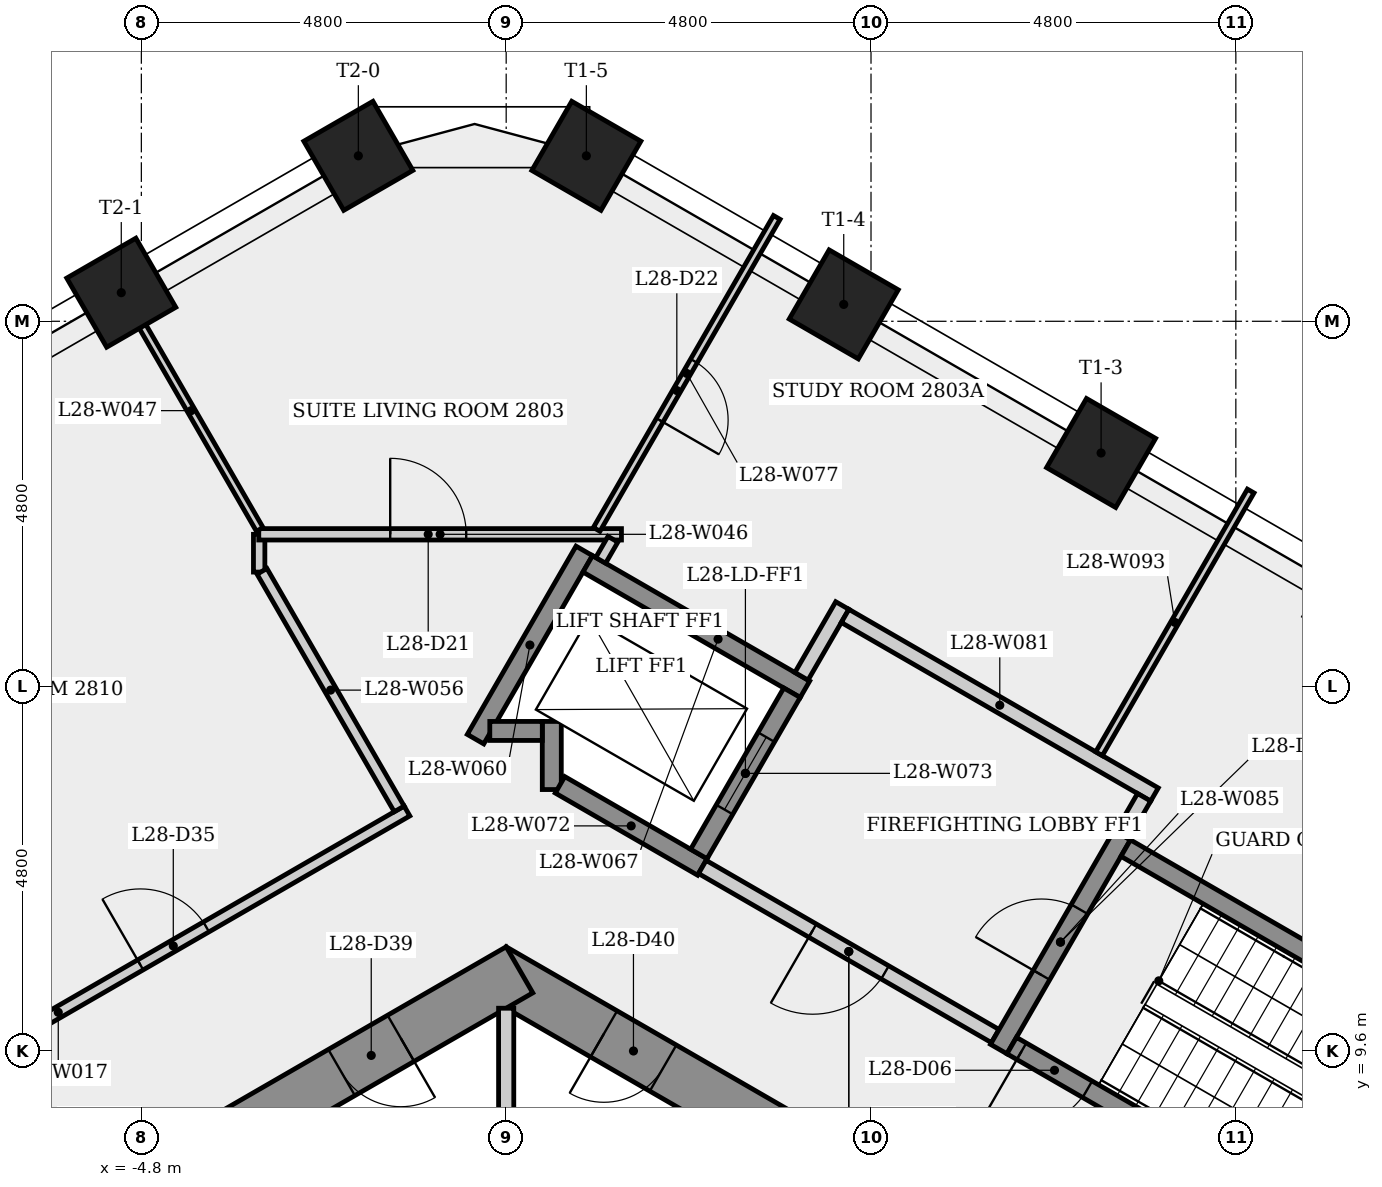
"""IFC4 building model, lengths in metres.
Left out: names, types, materials, properties, quantities, classifications, styles, units other than length and angle.
Written with IfcOpenShell. Run it as: python <this file> out.ifc"""

import sys

from ifc_helpers import new_model, si_unit, direction, frame, frame_2d, origin, origin_2d, place, context, subcontext, project, spatial, rectangle, extrude, element, fill, save


model = new_model("IFC4")
c1 = context("Model", 3, precision=1e-05, world=origin(), true_north=direction((0.0, 1.0)))
c2 = subcontext(c1, "Body", "Model", "MODEL_VIEW")
j1 = project(units=[si_unit("LENGTHUNIT", "METRE"), si_unit("PLANEANGLEUNIT", "RADIAN")], contexts=[c1])
p1 = place(None, origin())
s1 = spatial("IfcSite", under=j1, at=p1, CompositionType="ELEMENT")
p2 = place(p1, origin())
s2 = spatial("IfcBuilding", under=s1, at=p2, CompositionType="ELEMENT")
p3 = place(p2, frame((0.0, 0.0, 106.9)))
s3 = spatial("IfcBuildingStorey", under=s2, at=p3, CompositionType="ELEMENT", Elevation=106.9)
p4 = place(p3, frame((9.325, 5.182, 0.0), z_axis=(0.0, 0.0, 1.0), x_axis=(-0.866023993627, 0.500002442456, 0.0)))
e1 = element("IfcWall", 1, at=p4, inside=s3, PredefinedType="SHEAR", context=c2, shape_type="SweptSolid", body=[
    extrude(rectangle(XDim=10.97, YDim=0.7, at=frame_2d((5.485, 0.0))), origin(), (0.0, 0.0, 1.0), 3.4),
])
p5 = place(p4, frame((8.384, 0.0, 0.0)))
e2 = element("IfcOpeningElement", 2, at=p5, cuts=e1, PredefinedType="OPENING", context=c2, shape_type="SweptSolid", body=[
    extrude(rectangle(XDim=0.9, YDim=2.1, at=frame_2d((0.45, 1.05))), frame((0.0, 0.36, 0.0), z_axis=(0.0, -1.0, 0.0), x_axis=(1.0, 0.0, 0.0)), (0.0, 0.0, 1.0), 0.72),
])
p6 = place(p4, frame((1.663, 0.0, 0.0)))
e3 = element("IfcOpeningElement", 3, at=p6, cuts=e1, PredefinedType="OPENING", context=c2, shape_type="SweptSolid", body=[
    extrude(rectangle(XDim=0.9, YDim=2.1, at=frame_2d((0.45, 1.05))), frame((0.0, 0.36, 0.0), z_axis=(0.0, -1.0, 0.0), x_axis=(1.0, 0.0, 0.0)), (0.0, 0.0, 1.0), 0.72),
])
p7 = place(p3, frame((0.175, 10.667, 0.0), z_axis=(0.0, 0.0, 1.0), x_axis=(-0.866023993627, -0.500002442456, 0.0)))
e4 = element("IfcWall", 4, at=p7, inside=s3, PredefinedType="SHEAR", context=c2, shape_type="SweptSolid", body=[
    extrude(rectangle(XDim=10.97, YDim=0.7, at=frame_2d((5.485, 0.0))), origin(), (0.0, 0.0, 1.0), 3.4),
])
p8 = place(p7, frame((7.923, 0.0, 0.0)))
e5 = element("IfcOpeningElement", 5, at=p8, cuts=e4, PredefinedType="OPENING", context=c2, shape_type="SweptSolid", body=[
    extrude(rectangle(XDim=0.9, YDim=2.1, at=frame_2d((0.45, 1.05))), frame((0.0, 0.36, 0.0), z_axis=(0.0, -1.0, 0.0), x_axis=(1.0, 0.0, 0.0)), (0.0, 0.0, 1.0), 0.72),
])
p9 = place(p7, frame((1.802, 0.0, 0.0)))
e6 = element("IfcOpeningElement", 6, at=p9, cuts=e4, PredefinedType="OPENING", context=c2, shape_type="SweptSolid", body=[
    extrude(rectangle(XDim=0.9, YDim=2.1, at=frame_2d((0.45, 1.05))), frame((0.0, 0.36, 0.0), z_axis=(0.0, -1.0, 0.0), x_axis=(1.0, 0.0, 0.0)), (0.0, 0.0, 1.0), 0.72),
])
for number, where, z_axis, x_axis in (
    (7, (7.827, 17.467, 0.0), (0.0, 0.0, 1.0), (0.5, 0.866, 0.0)),
    (8, (4.441, 19.422, 0.0), (0.0, 0.0, 1.0), (0.5, 0.866, 0.0)),
    (9, (1.055, 21.377, 0.0), (0.0, 0.0, 1.0), (0.5, 0.866, 0.0)),
    (10, (-1.945, 21.377, 0.0), (0.0, 0.0, 1.0), (-0.5, 0.866, 0.0)),
    (11, (-5.064, 19.576, 0.0), (0.0, 0.0, 1.0), (-0.5, 0.866, 0.0)),
):
    element("IfcColumn", number, at=place(p3, frame(where, z_axis=z_axis, x_axis=x_axis)), inside=s3, PredefinedType="COLUMN", context=c2, shape_type="SweptSolid", body=[
        extrude(rectangle(XDim=1.05, YDim=1.05, at=origin_2d()), origin(), (0.0, 0.0, 1.0), 3.4),
    ])
p10 = place(p3, frame((-10.481, 7.458, 0.0), z_axis=(0.0, 0.0, 1.0), x_axis=(0.866018292242, 0.500012317351, 0.0)))
e12 = element("IfcWall", 12, at=p10, inside=s3, PredefinedType="PARTITIONING", context=c2, shape_type="SweptSolid", body=[
    extrude(rectangle(XDim=10.596, YDim=0.15, at=frame_2d((5.298, 0.0))), origin(), (0.0, 0.0, 1.0), 3.05),
])
p11 = place(p10, frame((6.546, 0.0, 0.0)))
e13 = element("IfcOpeningElement", 13, at=p11, cuts=e12, PredefinedType="OPENING", context=c2, shape_type="SweptSolid", body=[
    extrude(rectangle(XDim=1.0, YDim=2.1, at=frame_2d((0.5, 1.05))), frame((0.0, 0.085, 0.0), z_axis=(0.0, -1.0, 0.0), x_axis=(1.0, 0.0, 0.0)), (0.0, 0.0, 1.0), 0.17),
])
p12 = place(p3, frame((-3.25, 15.9, 0.0), z_axis=(0.0, 0.0, 1.0), x_axis=(0.0, 1.0, 0.0)))
e14 = element("IfcWall", 14, at=p12, inside=s3, PredefinedType="PARTITIONING", context=c2, shape_type="SweptSolid", body=[
    extrude(rectangle(XDim=0.497, YDim=0.15, at=frame_2d((0.249, 0.0))), origin(), (0.0, 0.0, 1.0), 3.05),
])
p13 = place(p3, frame((-3.255, 16.397, 0.0), z_axis=(0.0, 0.0, 1.0), x_axis=(1.0, 0.0, 0.0)))
e15 = element("IfcWall", 15, at=p13, inside=s3, PredefinedType="PARTITIONING", context=c2, shape_type="SweptSolid", body=[
    extrude(rectangle(XDim=4.772, YDim=0.15, at=frame_2d((2.386, 0.0))), origin(), (0.0, 0.0, 1.0), 3.05),
])
p14 = place(p13, frame((1.729, 0.0, 0.0)))
e16 = element("IfcOpeningElement", 16, at=p14, cuts=e15, PredefinedType="OPENING", context=c2, shape_type="SweptSolid", body=[
    extrude(rectangle(XDim=1.0, YDim=2.1, at=frame_2d((0.5, 1.05))), frame((0.0, 0.085, 0.0), z_axis=(0.0, -1.0, 0.0), x_axis=(1.0, 0.0, 0.0)), (0.0, 0.0, 1.0), 0.17),
])
p15 = place(p3, frame((-3.242, 16.462, 0.0), z_axis=(0.0, 0.0, 1.0), x_axis=(-0.500003616288, 0.866023315909, 0.0)))
e17 = element("IfcWall", 17, at=p15, inside=s3, PredefinedType="PARTITIONING", context=c2, shape_type="SweptSolid", body=[
    extrude(rectangle(XDim=3.608, YDim=0.1, at=frame_2d((1.804, 0.0))), origin(), (0.0, 0.0, 1.0), 3.05),
])
p16 = place(p3, frame((-1.408, 12.784, 0.0), z_axis=(0.0, 0.0, 1.0), x_axis=(-0.499950785441, 0.866053815959, 0.0)))
e18 = element("IfcWall", 18, at=p16, inside=s3, PredefinedType="PARTITIONING", context=c2, shape_type="SweptSolid", body=[
    extrude(rectangle(XDim=3.61, YDim=0.15, at=frame_2d((1.805, 0.0))), origin(), (0.0, 0.0, 1.0), 3.05),
])
p17 = place(p3, frame((-0.403, 13.702, 0.0), z_axis=(0.0, 0.0, 1.0), x_axis=(0.499976111731, 0.866039195244, 0.0)))
e19 = element("IfcWall", 19, at=p17, inside=s3, PredefinedType="SHEAR", context=c2, shape_type="SweptSolid", body=[
    extrude(rectangle(XDim=2.861, YDim=0.25, at=frame_2d((1.43, 0.0))), origin(), (0.0, 0.0, 1.0), 3.05),
])
p18 = place(p3, frame((0.0, 10.161, 0.0), z_axis=(0.0, 0.0, 1.0), x_axis=(0.0, -1.0, 0.0)))
e20 = element("IfcWall", 20, at=p18, inside=s3, PredefinedType="PARTITIONING", context=c2, shape_type="SweptSolid", body=[
    extrude(rectangle(XDim=4.886, YDim=0.2, at=frame_2d((2.443, 0.0))), origin(), (0.0, 0.0, 1.0), 3.05),
])
p19 = place(p3, frame((0.6, 13.039, 0.0), z_axis=(0.0, 0.0, 1.0), x_axis=(0.0, 1.0, 0.0)))
e21 = element("IfcWall", 21, at=p19, inside=s3, PredefinedType="SHEAR", context=c2, shape_type="SweptSolid", body=[
    extrude(rectangle(XDim=0.896, YDim=0.25, at=frame_2d((0.448, 0.0))), origin(), (0.0, 0.0, 1.0), 3.05),
])
p20 = place(p3, frame((0.475, 13.81, 0.0), z_axis=(0.0, 0.0, 1.0), x_axis=(-1.0, 0.0, 0.0)))
e22 = element("IfcWall", 22, at=p20, inside=s3, PredefinedType="SHEAR", context=c2, shape_type="SweptSolid", body=[
    extrude(rectangle(XDim=0.691, YDim=0.25, at=frame_2d((0.345, 0.0))), origin(), (0.0, 0.0, 1.0), 3.4),
])
p21 = place(p3, frame((1.073, 16.008, 0.0), z_axis=(0.0, 0.0, 1.0), x_axis=(0.866040211805, -0.499974350878, 0.0)))
e23 = element("IfcWall", 23, at=p21, inside=s3, PredefinedType="SHEAR", context=c2, shape_type="SweptSolid", body=[
    extrude(rectangle(XDim=3.3, YDim=0.25, at=frame_2d((1.65, 0.0))), origin(), (0.0, 0.0, 1.0), 3.05),
])
p22 = place(p3, frame((1.404, 16.332, 0.0), z_axis=(0.0, 0.0, 1.0), x_axis=(-0.500226934229, -0.865894343596, 0.0)))
e24 = element("IfcWall", 24, at=p22, inside=s3, PredefinedType="PARTITIONING", context=c2, shape_type="SweptSolid", body=[
    extrude(rectangle(XDim=0.321, YDim=0.15, at=frame_2d((0.161, 0.0))), origin(), (0.0, 0.0, 1.0), 3.05),
])
p23 = place(p3, frame((2.581, 12.02, 0.0), z_axis=(0.0, 0.0, 1.0), x_axis=(-0.86603892542, 0.499976579108, 0.0)))
e25 = element("IfcWall", 25, at=p23, inside=s3, PredefinedType="SHEAR", context=c2, shape_type="SweptSolid", body=[
    extrude(rectangle(XDim=2.162, YDim=0.25, at=frame_2d((1.081, 0.0))), origin(), (0.0, 0.0, 1.0), 3.05),
])
p24 = place(p3, frame((2.535, 12.191, 0.0), z_axis=(0.0, 0.0, 1.0), x_axis=(0.500061746146, 0.865989751695, 0.0)))
e26 = element("IfcWall", 26, at=p24, inside=s3, PredefinedType="SHEAR", context=c2, shape_type="SweptSolid", body=[
    extrude(rectangle(XDim=2.45, YDim=0.25, at=frame_2d((1.225, 0.0))), origin(), (0.0, 0.0, 1.0), 3.4),
])
p25 = place(p24, frame((0.675, 0.0, 0.0)))
e27 = element("IfcOpeningElement", 27, at=p25, cuts=e26, PredefinedType="OPENING", context=c2, shape_type="SweptSolid", body=[
    extrude(rectangle(XDim=1.1, YDim=2.1, at=frame_2d((0.55, 1.05))), frame((0.0, 0.135, 0.0), z_axis=(0.0, -1.0, 0.0), x_axis=(1.0, 0.0, 0.0)), (0.0, 0.0, 1.0), 0.27),
])
p26 = place(p3, frame((3.56, 20.566, 0.0), z_axis=(0.0, 0.0, 1.0), x_axis=(-0.500022688392, -0.866012304239, 0.0)))
e28 = element("IfcWall", 28, at=p26, inside=s3, PredefinedType="PARTITIONING", context=c2, shape_type="SweptSolid", body=[
    extrude(rectangle(XDim=4.74, YDim=0.1, at=frame_2d((2.37, 0.0))), origin(), (0.0, 0.0, 1.0), 3.05),
])
p27 = place(p26, frame((2.18, 0.0, 0.0)))
e29 = element("IfcOpeningElement", 29, at=p27, cuts=e28, PredefinedType="OPENING", context=c2, shape_type="SweptSolid", body=[
    extrude(rectangle(XDim=0.9, YDim=2.1, at=frame_2d((0.45, 1.05))), frame((0.0, 0.06, 0.0), z_axis=(0.0, -1.0, 0.0), x_axis=(1.0, 0.0, 0.0)), (0.0, 0.0, 1.0), 0.12),
])
p28 = place(p3, frame((3.885, 14.529, 0.0), z_axis=(0.0, 0.0, 1.0), x_axis=(0.499997628298, 0.866026773083, 0.0)))
e30 = element("IfcWall", 30, at=p28, inside=s3, PredefinedType="PARTITIONING", context=c2, shape_type="SweptSolid", body=[
    extrude(rectangle(XDim=1.075, YDim=0.2, at=frame_2d((0.538, 0.0))), origin(), (0.0, 0.0, 1.0), 3.05),
])
p29 = place(p3, frame((4.459, 15.323, 0.0), z_axis=(0.0, 0.0, 1.0), x_axis=(0.866016039709, -0.500016218704, 0.0)))
e31 = element("IfcWall", 31, at=p29, inside=s3, PredefinedType="PARTITIONING", context=c2, shape_type="SweptSolid", body=[
    extrude(rectangle(XDim=4.7, YDim=0.2, at=frame_2d((2.35, 0.0))), origin(), (0.0, 0.0, 1.0), 3.05),
])
p30 = place(p3, frame((6.435, 9.795, 0.0), z_axis=(0.0, 0.0, 1.0), x_axis=(-0.866012907634, 0.500021643343, 0.0)))
e32 = element("IfcWall", 32, at=p30, inside=s3, PredefinedType="PARTITIONING", context=c2, shape_type="SweptSolid", body=[
    extrude(rectangle(XDim=4.45, YDim=0.2, at=frame_2d((2.225, 0.0))), origin(), (0.0, 0.0, 1.0), 3.05),
])
p31 = place(p30, frame((1.675, 0.0, 0.0)))
e33 = element("IfcOpeningElement", 33, at=p31, cuts=e32, PredefinedType="OPENING", context=c2, shape_type="SweptSolid", body=[
    extrude(rectangle(XDim=1.1, YDim=2.1, at=frame_2d((0.55, 1.05))), frame((0.0, 0.11, 0.0), z_axis=(0.0, -1.0, 0.0), x_axis=(1.0, 0.0, 0.0)), (0.0, 0.0, 1.0), 0.22),
])
p32 = place(p3, frame((6.48, 9.624, 0.0), z_axis=(0.0, 0.0, 1.0), x_axis=(0.500017246033, 0.866015446554, 0.0)))
e34 = element("IfcWall", 34, at=p32, inside=s3, PredefinedType="SHEAR", context=c2, shape_type="SweptSolid", body=[
    extrude(rectangle(XDim=3.25, YDim=0.25, at=frame_2d((1.625, 0.0))), origin(), (0.0, 0.0, 1.0), 3.05),
])
p33 = place(p32, frame((1.125, 0.0, 0.0)))
e35 = element("IfcOpeningElement", 35, at=p33, cuts=e34, PredefinedType="OPENING", context=c2, shape_type="SweptSolid", body=[
    extrude(rectangle(XDim=1.0, YDim=2.1, at=frame_2d((0.5, 1.05))), frame((0.0, 0.135, 0.0), z_axis=(0.0, -1.0, 0.0), x_axis=(1.0, 0.0, 0.0)), (0.0, 0.0, 1.0), 0.27),
])
p34 = place(p3, frame((7.8, 13.51, 0.0), z_axis=(0.0, 0.0, 1.0), x_axis=(0.500020748167, 0.866013424493, 0.0)))
e36 = element("IfcWall", 36, at=p34, inside=s3, PredefinedType="PARTITIONING", context=c2, shape_type="SweptSolid", body=[
    extrude(rectangle(XDim=3.991, YDim=0.1, at=frame_2d((1.996, 0.0))), origin(), (0.0, 0.0, 1.0), 3.05),
])
p35 = place(p3, frame((8.151, 12.268, 0.0), z_axis=(0.0, 0.0, 1.0), x_axis=(0.866025499775, -0.499999833739, 0.0)))
e37 = element("IfcWall", 37, at=p35, inside=s3, PredefinedType="SHEAR", context=c2, shape_type="SweptSolid", body=[
    extrude(rectangle(XDim=6.4, YDim=0.25, at=frame_2d((3.2, 0.0))), origin(), (0.0, 0.0, 1.0), 3.05),
])
p36 = place(p3, frame((8.393, 12.937, 0.0), z_axis=(0.0, 0.0, 1.0), x_axis=(-0.500065409566, -0.86598763626, 0.0)))
e38 = element("IfcWall", 38, at=p36, inside=s3, PredefinedType="PARTITIONING", context=c2, shape_type="SweptSolid", body=[
    extrude(rectangle(XDim=0.575, YDim=0.2, at=frame_2d((0.288, 0.0))), origin(), (0.0, 0.0, 1.0), 3.05),
])
p37 = place(p3, frame((12.194, 6.47, 0.0), z_axis=(0.0, 0.0, 1.0), x_axis=(-0.866025499775, 0.499999833739, 0.0)))
e39 = element("IfcWall", 39, at=p37, inside=s3, PredefinedType="SHEAR", context=c2, shape_type="SweptSolid", body=[
    extrude(rectangle(XDim=6.4, YDim=0.25, at=frame_2d((3.2, 0.0))), origin(), (0.0, 0.0, 1.0), 3.05),
])
p38 = place(p37, frame((5.25, 0.0, 0.0)))
e40 = element("IfcOpeningElement", 40, at=p38, cuts=e39, PredefinedType="OPENING", context=c2, shape_type="SweptSolid", body=[
    extrude(rectangle(XDim=1.0, YDim=2.1, at=frame_2d((0.5, 1.05))), frame((0.0, 0.135, 0.0), z_axis=(0.0, -1.0, 0.0), x_axis=(1.0, 0.0, 0.0)), (0.0, 0.0, 1.0), 0.27),
])
p39 = place(p38, origin())
e41 = element("IfcDoor", 41, at=p39, inside=s3, OperationType="SINGLE_SWING_RIGHT", PredefinedType="DOOR", context=c2, shape_type="SweptSolid", body=[
    extrude(rectangle(XDim=1.0, YDim=2.1, at=frame_2d((0.5, 1.05))), frame((0.0, 0.025, 0.0), z_axis=(0.0, -1.0, 0.0), x_axis=(1.0, 0.0, 0.0)), (0.0, 0.0, 1.0), 0.05),
])
fill(e40, e41)
p40 = place(p33, origin())
e42 = element("IfcDoor", 42, at=p40, inside=s3, OperationType="SINGLE_SWING_LEFT", PredefinedType="DOOR", context=c2, shape_type="SweptSolid", body=[
    extrude(rectangle(XDim=1.0, YDim=2.1, at=frame_2d((0.5, 1.05))), frame((0.0, 0.025, 0.0), z_axis=(0.0, -1.0, 0.0), x_axis=(1.0, 0.0, 0.0)), (0.0, 0.0, 1.0), 0.05),
])
fill(e35, e42)
p41 = place(p31, origin())
e43 = element("IfcDoor", 43, at=p41, inside=s3, OperationType="SINGLE_SWING_RIGHT", PredefinedType="DOOR", context=c2, shape_type="SweptSolid", body=[
    extrude(rectangle(XDim=1.1, YDim=2.1, at=frame_2d((0.55, 1.05))), frame((0.0, 0.025, 0.0), z_axis=(0.0, -1.0, 0.0), x_axis=(1.0, 0.0, 0.0)), (0.0, 0.0, 1.0), 0.05),
])
fill(e33, e43)
p42 = place(p25, origin())
e44 = element("IfcDoor", 44, at=p42, inside=s3, OperationType="SLIDING_TO_LEFT", PredefinedType="DOOR", context=c2, shape_type="SweptSolid", body=[
    extrude(rectangle(XDim=1.1, YDim=2.1, at=frame_2d((0.55, 1.05))), frame((0.0, 0.025, 0.0), z_axis=(0.0, -1.0, 0.0), x_axis=(1.0, 0.0, 0.0)), (0.0, 0.0, 1.0), 0.05),
])
fill(e27, e44)
p43 = place(p14, origin())
e45 = element("IfcDoor", 45, at=p43, inside=s3, OperationType="SINGLE_SWING_LEFT", PredefinedType="DOOR", context=c2, shape_type="SweptSolid", body=[
    extrude(rectangle(XDim=1.0, YDim=2.1, at=frame_2d((0.5, 1.05))), frame((0.0, 0.025, 0.0), z_axis=(0.0, -1.0, 0.0), x_axis=(1.0, 0.0, 0.0)), (0.0, 0.0, 1.0), 0.05),
])
fill(e16, e45)
p44 = place(p27, origin())
e46 = element("IfcDoor", 46, at=p44, inside=s3, OperationType="SINGLE_SWING_RIGHT", PredefinedType="DOOR", context=c2, shape_type="SweptSolid", body=[
    extrude(rectangle(XDim=0.9, YDim=2.1, at=frame_2d((0.45, 1.05))), frame((0.0, 0.025, 0.0), z_axis=(0.0, -1.0, 0.0), x_axis=(1.0, 0.0, 0.0)), (0.0, 0.0, 1.0), 0.05),
])
fill(e29, e46)
p45 = place(p11, origin())
e47 = element("IfcDoor", 47, at=p45, inside=s3, OperationType="SINGLE_SWING_LEFT", PredefinedType="DOOR", context=c2, shape_type="SweptSolid", body=[
    extrude(rectangle(XDim=1.0, YDim=2.1, at=frame_2d((0.5, 1.05))), frame((0.0, 0.025, 0.0), z_axis=(0.0, -1.0, 0.0), x_axis=(1.0, 0.0, 0.0)), (0.0, 0.0, 1.0), 0.05),
])
fill(e13, e47)
p46 = place(p9, origin())
e48 = element("IfcDoor", 48, at=p46, inside=s3, OperationType="SINGLE_SWING_LEFT", PredefinedType="DOOR", context=c2, shape_type="SweptSolid", body=[
    extrude(rectangle(XDim=0.9, YDim=2.1, at=frame_2d((0.45, 1.05))), frame((0.0, 0.025, 0.0), z_axis=(0.0, -1.0, 0.0), x_axis=(1.0, 0.0, 0.0)), (0.0, 0.0, 1.0), 0.05),
])
fill(e6, e48)
p47 = place(p5, origin())
e49 = element("IfcDoor", 49, at=p47, inside=s3, OperationType="SINGLE_SWING_RIGHT", PredefinedType="DOOR", context=c2, shape_type="SweptSolid", body=[
    extrude(rectangle(XDim=0.9, YDim=2.1, at=frame_2d((0.45, 1.05))), frame((0.0, 0.025, 0.0), z_axis=(0.0, -1.0, 0.0), x_axis=(1.0, 0.0, 0.0)), (0.0, 0.0, 1.0), 0.05),
])
fill(e2, e49)
save(model, sys.argv[1])
